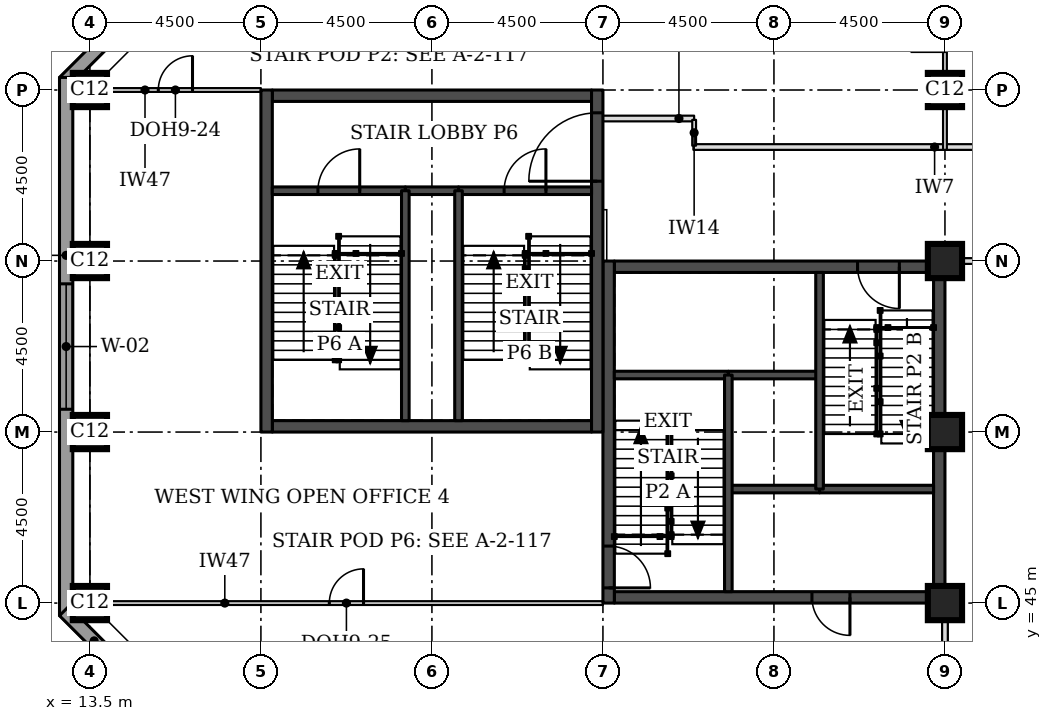
"""IFC4 building model, lengths in metres.
Left out: names, types, materials, properties, quantities, classifications, styles, units other than length and angle.
Written with IfcOpenShell. Run it as: python <this file> out.ifc"""

import sys

from ifc_helpers import new_model, si_unit, direction, frame, frame_2d, origin, origin_2d, place, context, subcontext, project, spatial, rectangle, extrude, element, fill, save


model = new_model("IFC4")
c1 = context("Model", 3, precision=1e-05, world=origin(), true_north=direction((0.0, 1.0)))
c2 = subcontext(c1, "Body", "Model", "MODEL_VIEW")
j1 = project(units=[si_unit("LENGTHUNIT", "METRE"), si_unit("PLANEANGLEUNIT", "RADIAN")], contexts=[c1])
p1 = place(None, origin())
s1 = spatial("IfcSite", under=j1, at=p1, CompositionType="ELEMENT")
p2 = place(p1, origin())
s2 = spatial("IfcBuilding", under=s1, at=p2, CompositionType="ELEMENT")
p3 = place(p2, frame((0.0, 0.0, 215.6)))
s3 = spatial("IfcBuildingStorey", under=s2, at=p3, CompositionType="ELEMENT", Elevation=215.6)
for number, where, z_axis, x_axis in (
    (1, (13.5, 45.0, 0.0), (0.0, 0.0, 1.0), (1.0, 0.0, 0.0)),
    (2, (36.0, 45.0, 0.0), (0.0, 0.0, 1.0), (1.0, 0.0, 0.0)),
    (3, (13.5, 49.5, 0.0), (0.0, 0.0, 1.0), (1.0, 0.0, 0.0)),
    (4, (36.0, 49.5, 0.0), (0.0, 0.0, 1.0), (1.0, 0.0, 0.0)),
    (5, (13.5, 54.0, 0.0), (0.0, 0.0, 1.0), (1.0, 0.0, 0.0)),
    (6, (36.0, 54.0, 0.0), (0.0, 0.0, 1.0), (1.0, 0.0, 0.0)),
    (7, (13.5, 58.5, 0.0), (0.0, 0.0, 1.0), (1.0, 0.0, 0.0)),
    (8, (36.0, 58.5, 0.0), (0.0, 0.0, 1.0), (1.0, 0.0, 0.0)),
):
    element("IfcColumn", number, at=place(p3, frame(where, z_axis=z_axis, x_axis=x_axis)), inside=s3, PredefinedType="COLUMN", context=c2, shape_type="SweptSolid", body=[
        extrude(rectangle(XDim=0.9, YDim=0.9, at=origin_2d()), origin(), (0.0, 0.0, 1.0), 3.7),
    ])
p4 = place(p3, frame((27.3, 45.15, 0.0), z_axis=(0.0, 0.0, 1.0), x_axis=(1.0, 0.0, 0.0)))
e9 = element("IfcWall", 9, at=p4, inside=s3, PredefinedType="SHEAR", context=c2, shape_type="SweptSolid", body=[
    extrude(rectangle(XDim=8.4, YDim=0.3, at=frame_2d((4.2, 0.0))), origin(), (0.0, 0.0, 1.0), 3.7),
])
p5 = place(p4, frame((5.2, 0.0, 0.0)))
e10 = element("IfcOpeningElement", 10, at=p5, cuts=e9, PredefinedType="OPENING", context=c2, shape_type="SweptSolid", body=[
    extrude(rectangle(XDim=1.0, YDim=2.1, at=frame_2d((0.5, 1.05))), frame((0.0, 0.16, 0.0), z_axis=(0.0, -1.0, 0.0), x_axis=(1.0, 0.0, 0.0)), (0.0, 0.0, 1.0), 0.32),
])
p6 = place(p3, frame((27.3, 53.85, 0.0), z_axis=(0.0, 0.0, 1.0), x_axis=(1.0, 0.0, 0.0)))
e11 = element("IfcWall", 11, at=p6, inside=s3, PredefinedType="SHEAR", context=c2, shape_type="SweptSolid", body=[
    extrude(rectangle(XDim=8.4, YDim=0.3, at=frame_2d((4.2, 0.0))), origin(), (0.0, 0.0, 1.0), 3.7),
])
p7 = place(p6, frame((6.4, 0.0, 0.0)))
e12 = element("IfcOpeningElement", 12, at=p7, cuts=e11, PredefinedType="OPENING", context=c2, shape_type="SweptSolid", body=[
    extrude(rectangle(XDim=1.1, YDim=2.1, at=frame_2d((0.55, 1.05))), frame((0.0, 0.16, 0.0), z_axis=(0.0, -1.0, 0.0), x_axis=(1.0, 0.0, 0.0)), (0.0, 0.0, 1.0), 0.32),
])
p8 = place(p3, frame((27.15, 45.0, 0.0), z_axis=(0.0, 0.0, 1.0), x_axis=(0.0, 1.0, 0.0)))
e13 = element("IfcWall", 13, at=p8, inside=s3, PredefinedType="SHEAR", context=c2, shape_type="SweptSolid", body=[
    extrude(rectangle(XDim=9.0, YDim=0.3, at=frame_2d((4.5, 0.0))), origin(), (0.0, 0.0, 1.0), 3.7),
])
p9 = place(p8, frame((0.4, 0.0, 0.0)))
e14 = element("IfcOpeningElement", 14, at=p9, cuts=e13, PredefinedType="OPENING", context=c2, shape_type="SweptSolid", body=[
    extrude(rectangle(XDim=1.1, YDim=2.1, at=frame_2d((0.55, 1.05))), frame((0.0, 0.16, 0.0), z_axis=(0.0, -1.0, 0.0), x_axis=(1.0, 0.0, 0.0)), (0.0, 0.0, 1.0), 0.32),
])
p10 = place(p3, frame((35.85, 45.0, 0.0), z_axis=(0.0, 0.0, 1.0), x_axis=(0.0, 1.0, 0.0)))
e15 = element("IfcWall", 15, at=p10, inside=s3, PredefinedType="SHEAR", context=c2, shape_type="SweptSolid", body=[
    extrude(rectangle(XDim=9.0, YDim=0.3, at=frame_2d((4.5, 0.0))), origin(), (0.0, 0.0, 1.0), 3.7),
])
for number, where, z_axis, x_axis in (
    (16, (18.3, 49.65, 0.0), (0.0, 0.0, 1.0), (1.0, 0.0, 0.0)),
    (17, (18.3, 58.35, 0.0), (0.0, 0.0, 1.0), (1.0, 0.0, 0.0)),
):
    element("IfcWall", number, at=place(p3, frame(where, z_axis=z_axis, x_axis=x_axis)), inside=s3, PredefinedType="SHEAR", context=c2, shape_type="SweptSolid", body=[
        extrude(rectangle(XDim=8.4, YDim=0.3, at=frame_2d((4.2, 0.0))), origin(), (0.0, 0.0, 1.0), 3.7),
    ])
p11 = place(p3, frame((18.15, 49.5, 0.0), z_axis=(0.0, 0.0, 1.0), x_axis=(0.0, 1.0, 0.0)))
e18 = element("IfcWall", 18, at=p11, inside=s3, PredefinedType="SHEAR", context=c2, shape_type="SweptSolid", body=[
    extrude(rectangle(XDim=9.0, YDim=0.3, at=frame_2d((4.5, 0.0))), origin(), (0.0, 0.0, 1.0), 3.7),
])
p12 = place(p3, frame((26.85, 49.5, 0.0), z_axis=(0.0, 0.0, 1.0), x_axis=(0.0, 1.0, 0.0)))
e19 = element("IfcWall", 19, at=p12, inside=s3, PredefinedType="SHEAR", context=c2, shape_type="SweptSolid", body=[
    extrude(rectangle(XDim=9.0, YDim=0.3, at=frame_2d((4.5, 0.0))), origin(), (0.0, 0.0, 1.0), 3.7),
])
p13 = place(p12, frame((6.6, 0.0, 0.0)))
e20 = element("IfcOpeningElement", 20, at=p13, cuts=e19, PredefinedType="OPENING", context=c2, shape_type="SweptSolid", body=[
    extrude(rectangle(XDim=1.8, YDim=2.1, at=frame_2d((0.9, 1.05))), frame((0.0, 0.16, 0.0), z_axis=(0.0, -1.0, 0.0), x_axis=(1.0, 0.0, 0.0)), (0.0, 0.0, 1.0), 0.32),
])
p14 = place(p3, frame((17.792, 63.676, 0.0), z_axis=(0.0, 0.0, 1.0), x_axis=(-0.707106781187, -0.707106781187, 0.0)))
e21 = element("IfcWall", 21, at=p14, inside=s3, PredefinedType="STANDARD", context=c2, shape_type="SweptSolid", body=[
    extrude(rectangle(XDim=7.027, YDim=0.35, at=frame_2d((3.513, 0.0))), origin(), (0.0, 0.0, 1.0), 3.525),
])
p15 = place(p14, frame((1.863, 0.0, 0.9)))
e22 = element("IfcOpeningElement", 22, at=p15, cuts=e21, PredefinedType="OPENING", context=c2, shape_type="SweptSolid", body=[
    extrude(rectangle(XDim=3.3, YDim=1.9, at=frame_2d((1.65, 0.95))), frame((0.0, 0.185, 0.0), z_axis=(0.0, -1.0, 0.0), x_axis=(1.0, 0.0, 0.0)), (0.0, 0.0, 1.0), 0.37),
])
p16 = place(p3, frame((12.875, 58.831, 0.0), z_axis=(0.0, 0.0, 1.0), x_axis=(0.0, -1.0, 0.0)))
e23 = element("IfcWall", 23, at=p16, inside=s3, PredefinedType="STANDARD", context=c2, shape_type="SweptSolid", body=[
    extrude(rectangle(XDim=14.163, YDim=0.35, at=frame_2d((7.081, 0.0))), origin(), (0.0, 0.0, 1.0), 3.525),
])
p17 = place(p16, frame((5.431, 0.0, 0.9)))
e24 = element("IfcOpeningElement", 24, at=p17, cuts=e23, PredefinedType="OPENING", context=c2, shape_type="SweptSolid", body=[
    extrude(rectangle(XDim=3.3, YDim=1.9, at=frame_2d((1.65, 0.95))), frame((0.0, 0.185, 0.0), z_axis=(0.0, -1.0, 0.0), x_axis=(1.0, 0.0, 0.0)), (0.0, 0.0, 1.0), 0.37),
])
p18 = place(p3, frame((12.824, 44.792, 0.0), z_axis=(0.0, 0.0, 1.0), x_axis=(0.707106781187, -0.707106781187, 0.0)))
e25 = element("IfcWall", 25, at=p18, inside=s3, PredefinedType="STANDARD", context=c2, shape_type="SweptSolid", body=[
    extrude(rectangle(XDim=7.027, YDim=0.35, at=frame_2d((3.513, 0.0))), origin(), (0.0, 0.0, 1.0), 3.525),
])
p19 = place(p18, frame((1.863, 0.0, 0.9)))
e26 = element("IfcOpeningElement", 26, at=p19, cuts=e25, PredefinedType="OPENING", context=c2, shape_type="SweptSolid", body=[
    extrude(rectangle(XDim=3.3, YDim=1.9, at=frame_2d((1.65, 0.95))), frame((0.0, 0.185, 0.0), z_axis=(0.0, -1.0, 0.0), x_axis=(1.0, 0.0, 0.0)), (0.0, 0.0, 1.0), 0.37),
])
p20 = place(p3, frame((36.45, 54.0, 0.0), z_axis=(0.0, 0.0, 1.0), x_axis=(1.0, 0.0, 0.0)))
e27 = element("IfcWall", 27, at=p20, inside=s3, PredefinedType="PARTITIONING", context=c2, shape_type="SweptSolid", body=[
    extrude(rectangle(XDim=5.625, YDim=0.15, at=frame_2d((2.812, 0.0))), origin(), (0.0, 0.0, 1.0), 3.55),
])
p21 = place(p3, frame((29.38, 57.0, 0.0), z_axis=(0.0, 0.0, 1.0), x_axis=(1.0, 0.0, 0.0)))
e28 = element("IfcWall", 28, at=p21, inside=s3, PredefinedType="PARTITIONING", context=c2, shape_type="SweptSolid", body=[
    extrude(rectangle(XDim=12.695, YDim=0.15, at=frame_2d((6.348, 0.0))), origin(), (0.0, 0.0, 1.0), 3.55),
])
p22 = place(p3, frame((36.0, 40.95, 0.0), z_axis=(0.0, 0.0, 1.0), x_axis=(0.0, 1.0, 0.0)))
e29 = element("IfcWall", 29, at=p22, inside=s3, PredefinedType="PARTITIONING", context=c2, shape_type="SweptSolid", body=[
    extrude(rectangle(XDim=3.63, YDim=0.15, at=frame_2d((1.815, 0.0))), origin(), (0.0, 0.0, 1.0), 2.8),
])
p23 = place(p22, frame((1.4, 0.0, 0.0)))
e30 = element("IfcOpeningElement", 30, at=p23, cuts=e29, PredefinedType="OPENING", context=c2, shape_type="SweptSolid", body=[
    extrude(rectangle(XDim=0.9, YDim=2.1, at=frame_2d((0.45, 1.05))), frame((0.0, 0.085, 0.0), z_axis=(0.0, -1.0, 0.0), x_axis=(1.0, 0.0, 0.0)), (0.0, 0.0, 1.0), 0.17),
])
p24 = place(p3, frame((36.0, 63.0, 0.0), z_axis=(0.0, 0.0, 1.0), x_axis=(0.0, -1.0, 0.0)))
e31 = element("IfcWall", 31, at=p24, inside=s3, PredefinedType="PARTITIONING", context=c2, shape_type="SweptSolid", body=[
    extrude(rectangle(XDim=6.075, YDim=0.1, at=frame_2d((3.038, 0.0))), origin(), (0.0, 0.0, 1.0), 2.8),
])
p25 = place(p24, frame((2.588, 0.0, 0.0)))
e32 = element("IfcOpeningElement", 32, at=p25, cuts=e31, PredefinedType="OPENING", context=c2, shape_type="SweptSolid", body=[
    extrude(rectangle(XDim=0.9, YDim=2.1, at=frame_2d((0.45, 1.05))), frame((0.0, 0.06, 0.0), z_axis=(0.0, -1.0, 0.0), x_axis=(1.0, 0.0, 0.0)), (0.0, 0.0, 1.0), 0.12),
])
p26 = place(p3, frame((13.5, 58.5, 0.0), z_axis=(0.0, 0.0, 1.0), x_axis=(1.0, 0.0, 0.0)))
e33 = element("IfcWall", 33, at=p26, inside=s3, PredefinedType="PARTITIONING", context=c2, shape_type="SweptSolid", body=[
    extrude(rectangle(XDim=4.5, YDim=0.1, at=frame_2d((2.25, 0.0))), origin(), (0.0, 0.0, 1.0), 2.55),
])
p27 = place(p26, frame((1.8, 0.0, 0.0)))
e34 = element("IfcOpeningElement", 34, at=p27, cuts=e33, PredefinedType="OPENING", context=c2, shape_type="SweptSolid", body=[
    extrude(rectangle(XDim=0.9, YDim=2.1, at=frame_2d((0.45, 1.05))), frame((0.0, 0.06, 0.0), z_axis=(0.0, -1.0, 0.0), x_axis=(1.0, 0.0, 0.0)), (0.0, 0.0, 1.0), 0.12),
])
p28 = place(p3, frame((13.5, 45.0, 0.0), z_axis=(0.0, 0.0, 1.0), x_axis=(1.0, 0.0, 0.0)))
e35 = element("IfcWall", 35, at=p28, inside=s3, PredefinedType="PARTITIONING", context=c2, shape_type="SweptSolid", body=[
    extrude(rectangle(XDim=13.5, YDim=0.1, at=frame_2d((6.75, 0.0))), origin(), (0.0, 0.0, 1.0), 2.55),
])
p29 = place(p28, frame((6.3, 0.0, 0.0)))
e36 = element("IfcOpeningElement", 36, at=p29, cuts=e35, PredefinedType="OPENING", context=c2, shape_type="SweptSolid", body=[
    extrude(rectangle(XDim=0.9, YDim=2.1, at=frame_2d((0.45, 1.05))), frame((0.0, 0.06, 0.0), z_axis=(0.0, -1.0, 0.0), x_axis=(1.0, 0.0, 0.0)), (0.0, 0.0, 1.0), 0.12),
])
p30 = place(p3, frame((27.0, 57.75, 0.0), z_axis=(0.0, 0.0, 1.0), x_axis=(1.0, 0.0, 0.0)))
e37 = element("IfcWall", 37, at=p30, inside=s3, PredefinedType="PARTITIONING", context=c2, shape_type="SweptSolid", body=[
    extrude(rectangle(XDim=2.4, YDim=0.15, at=frame_2d((1.2, 0.0))), origin(), (0.0, 0.0, 1.0), 3.55),
])
p31 = place(p3, frame((29.4, 57.715, 0.0), z_axis=(0.0, 0.0, 1.0), x_axis=(0.0, -1.0, 0.0)))
e38 = element("IfcWall", 38, at=p31, inside=s3, PredefinedType="PARTITIONING", context=c2, shape_type="SweptSolid", body=[
    extrude(rectangle(XDim=0.68, YDim=0.1, at=frame_2d((0.34, 0.0))), origin(), (0.0, 0.0, 1.0), 3.55),
])
p32 = place(p3, frame((30.3, 48.0, 0.0), z_axis=(0.0, 0.0, 1.0), x_axis=(1.0, 0.0, 0.0)))
e39 = element("IfcWall", 39, at=p32, inside=s3, PredefinedType="SOLIDWALL", context=c2, shape_type="SweptSolid", body=[
    extrude(rectangle(XDim=2.4, YDim=0.2, at=frame_2d((1.2, 0.0))), origin(), (0.0, 0.0, 1.0), 3.55),
])
p33 = place(p3, frame((32.7, 48.0, 0.0), z_axis=(0.0, 0.0, 1.0), x_axis=(1.0, 0.0, 0.0)))
e40 = element("IfcWall", 40, at=p33, inside=s3, PredefinedType="SOLIDWALL", context=c2, shape_type="SweptSolid", body=[
    extrude(rectangle(XDim=3.0, YDim=0.2, at=frame_2d((1.5, 0.0))), origin(), (0.0, 0.0, 1.0), 3.55),
])
p34 = place(p3, frame((30.3, 51.0, 0.0), z_axis=(0.0, 0.0, 1.0), x_axis=(1.0, 0.0, 0.0)))
e41 = element("IfcWall", 41, at=p34, inside=s3, PredefinedType="SOLIDWALL", context=c2, shape_type="SweptSolid", body=[
    extrude(rectangle(XDim=2.4, YDim=0.2, at=frame_2d((1.2, 0.0))), origin(), (0.0, 0.0, 1.0), 3.7),
])
p35 = place(p3, frame((27.3, 51.0, 0.0), z_axis=(0.0, 0.0, 1.0), x_axis=(1.0, 0.0, 0.0)))
e42 = element("IfcWall", 42, at=p35, inside=s3, PredefinedType="SOLIDWALL", context=c2, shape_type="SweptSolid", body=[
    extrude(rectangle(XDim=3.0, YDim=0.2, at=frame_2d((1.5, 0.0))), origin(), (0.0, 0.0, 1.0), 3.55),
])
for number, where, z_axis, x_axis in (
    (43, (30.3, 45.3, 0.0), (0.0, 0.0, 1.0), (0.0, 1.0, 0.0)),
    (44, (32.7, 48.0, 0.0), (0.0, 0.0, 1.0), (0.0, 1.0, 0.0)),
):
    element("IfcWall", number, at=place(p3, frame(where, z_axis=z_axis, x_axis=x_axis)), inside=s3, PredefinedType="SOLIDWALL", context=c2, shape_type="SweptSolid", body=[
        extrude(rectangle(XDim=5.7, YDim=0.2, at=frame_2d((2.85, 0.0))), origin(), (0.0, 0.0, 1.0), 3.55),
    ])
p36 = place(p3, frame((21.8, 55.85, 0.0), z_axis=(0.0, 0.0, 1.0), x_axis=(1.0, 0.0, 0.0)))
e45 = element("IfcWall", 45, at=p36, inside=s3, PredefinedType="SOLIDWALL", context=c2, shape_type="SweptSolid", body=[
    extrude(rectangle(XDim=1.4, YDim=0.2, at=frame_2d((0.7, 0.0))), origin(), (0.0, 0.0, 1.0), 3.55),
])
p37 = place(p3, frame((18.3, 55.85, 0.0), z_axis=(0.0, 0.0, 1.0), x_axis=(1.0, 0.0, 0.0)))
e46 = element("IfcWall", 46, at=p37, inside=s3, PredefinedType="SOLIDWALL", context=c2, shape_type="SweptSolid", body=[
    extrude(rectangle(XDim=3.5, YDim=0.2, at=frame_2d((1.75, 0.0))), origin(), (0.0, 0.0, 1.0), 3.55),
])
p38 = place(p37, frame((1.2, 0.0, 0.0)))
e47 = element("IfcOpeningElement", 47, at=p38, cuts=e46, PredefinedType="OPENING", context=c2, shape_type="SweptSolid", body=[
    extrude(rectangle(XDim=1.1, YDim=2.1, at=frame_2d((0.55, 1.05))), frame((0.0, 0.11, 0.0), z_axis=(0.0, -1.0, 0.0), x_axis=(1.0, 0.0, 0.0)), (0.0, 0.0, 1.0), 0.22),
])
p39 = place(p3, frame((23.2, 55.85, 0.0), z_axis=(0.0, 0.0, 1.0), x_axis=(1.0, 0.0, 0.0)))
e48 = element("IfcWall", 48, at=p39, inside=s3, PredefinedType="SOLIDWALL", context=c2, shape_type="SweptSolid", body=[
    extrude(rectangle(XDim=3.5, YDim=0.2, at=frame_2d((1.75, 0.0))), origin(), (0.0, 0.0, 1.0), 3.55),
])
p40 = place(p39, frame((1.2, 0.0, 0.0)))
e49 = element("IfcOpeningElement", 49, at=p40, cuts=e48, PredefinedType="OPENING", context=c2, shape_type="SweptSolid", body=[
    extrude(rectangle(XDim=1.1, YDim=2.1, at=frame_2d((0.55, 1.05))), frame((0.0, 0.11, 0.0), z_axis=(0.0, -1.0, 0.0), x_axis=(1.0, 0.0, 0.0)), (0.0, 0.0, 1.0), 0.22),
])
for number, where, z_axis, x_axis in (
    (50, (21.8, 49.8, 0.0), (0.0, 0.0, 1.0), (0.0, 1.0, 0.0)),
    (51, (23.2, 49.8, 0.0), (0.0, 0.0, 1.0), (0.0, 1.0, 0.0)),
):
    element("IfcWall", number, at=place(p3, frame(where, z_axis=z_axis, x_axis=x_axis)), inside=s3, PredefinedType="SOLIDWALL", context=c2, shape_type="SweptSolid", body=[
        extrude(rectangle(XDim=6.05, YDim=0.2, at=frame_2d((3.025, 0.0))), origin(), (0.0, 0.0, 1.0), 3.55),
    ])
p41 = place(p17, origin())
e52 = element("IfcWindow", 52, at=p41, inside=s3, PartitioningType="SINGLE_PANEL", PredefinedType="WINDOW", context=c2, shape_type="SweptSolid", body=[
    extrude(rectangle(XDim=3.3, YDim=1.9, at=frame_2d((1.65, 0.95))), frame((0.0, 0.085, 0.0), z_axis=(0.0, -1.0, 0.0), x_axis=(1.0, 0.0, 0.0)), (0.0, 0.0, 1.0), 0.06),
])
fill(e24, e52)
p42 = place(p27, origin())
e53 = element("IfcDoor", 53, at=p42, inside=s3, OperationType="SINGLE_SWING_RIGHT", PredefinedType="DOOR", context=c2, shape_type="SweptSolid", body=[
    extrude(rectangle(XDim=0.9, YDim=2.1, at=frame_2d((0.45, 1.05))), frame((0.0, 0.025, 0.0), z_axis=(0.0, -1.0, 0.0), x_axis=(1.0, 0.0, 0.0)), (0.0, 0.0, 1.0), 0.05),
])
fill(e34, e53)
p43 = place(p29, origin())
e54 = element("IfcDoor", 54, at=p43, inside=s3, OperationType="SINGLE_SWING_RIGHT", PredefinedType="DOOR", context=c2, shape_type="SweptSolid", body=[
    extrude(rectangle(XDim=0.9, YDim=2.1, at=frame_2d((0.45, 1.05))), frame((0.0, 0.025, 0.0), z_axis=(0.0, -1.0, 0.0), x_axis=(1.0, 0.0, 0.0)), (0.0, 0.0, 1.0), 0.05),
])
fill(e36, e54)
p44 = place(p9, frame((1.1, 0.0, 0.0), z_axis=(0.0, 0.0, 1.0), x_axis=(-1.0, 0.0, 0.0)))
e55 = element("IfcDoor", 55, at=p44, inside=s3, OperationType="SINGLE_SWING_RIGHT", PredefinedType="DOOR", context=c2, shape_type="SweptSolid", body=[
    extrude(rectangle(XDim=1.1, YDim=2.1, at=frame_2d((0.55, 1.05))), frame((0.0, 0.025, 0.0), z_axis=(0.0, -1.0, 0.0), x_axis=(1.0, 0.0, 0.0)), (0.0, 0.0, 1.0), 0.05),
])
fill(e14, e55)
p45 = place(p7, frame((1.1, 0.0, 0.0), z_axis=(0.0, 0.0, 1.0), x_axis=(-1.0, 0.0, 0.0)))
e56 = element("IfcDoor", 56, at=p45, inside=s3, OperationType="SINGLE_SWING_LEFT", PredefinedType="DOOR", context=c2, shape_type="SweptSolid", body=[
    extrude(rectangle(XDim=1.1, YDim=2.1, at=frame_2d((0.55, 1.05))), frame((0.0, 0.025, 0.0), z_axis=(0.0, -1.0, 0.0), x_axis=(1.0, 0.0, 0.0)), (0.0, 0.0, 1.0), 0.05),
])
fill(e12, e56)
p46 = place(p5, frame((1.0, 0.0, 0.0), z_axis=(0.0, 0.0, 1.0), x_axis=(-1.0, 0.0, 0.0)))
e57 = element("IfcDoor", 57, at=p46, inside=s3, OperationType="SINGLE_SWING_LEFT", PredefinedType="DOOR", context=c2, shape_type="SweptSolid", body=[
    extrude(rectangle(XDim=1.0, YDim=2.1, at=frame_2d((0.5, 1.05))), frame((0.0, 0.025, 0.0), z_axis=(0.0, -1.0, 0.0), x_axis=(1.0, 0.0, 0.0)), (0.0, 0.0, 1.0), 0.05),
])
fill(e10, e57)
p47 = place(p38, origin())
e58 = element("IfcDoor", 58, at=p47, inside=s3, OperationType="SINGLE_SWING_RIGHT", PredefinedType="DOOR", context=c2, shape_type="SweptSolid", body=[
    extrude(rectangle(XDim=1.1, YDim=2.1, at=frame_2d((0.55, 1.05))), frame((0.0, 0.025, 0.0), z_axis=(0.0, -1.0, 0.0), x_axis=(1.0, 0.0, 0.0)), (0.0, 0.0, 1.0), 0.05),
])
fill(e47, e58)
p48 = place(p40, origin())
e59 = element("IfcDoor", 59, at=p48, inside=s3, OperationType="SINGLE_SWING_RIGHT", PredefinedType="DOOR", context=c2, shape_type="SweptSolid", body=[
    extrude(rectangle(XDim=1.1, YDim=2.1, at=frame_2d((0.55, 1.05))), frame((0.0, 0.025, 0.0), z_axis=(0.0, -1.0, 0.0), x_axis=(1.0, 0.0, 0.0)), (0.0, 0.0, 1.0), 0.05),
])
fill(e49, e59)
p49 = place(p13, origin())
e60 = element("IfcDoor", 60, at=p49, inside=s3, OperationType="SINGLE_SWING_LEFT", PredefinedType="DOOR", context=c2, shape_type="SweptSolid", body=[
    extrude(rectangle(XDim=1.8, YDim=2.1, at=frame_2d((0.9, 1.05))), frame((0.0, 0.025, 0.0), z_axis=(0.0, -1.0, 0.0), x_axis=(1.0, 0.0, 0.0)), (0.0, 0.0, 1.0), 0.05),
])
fill(e20, e60)
save(model, sys.argv[1])
